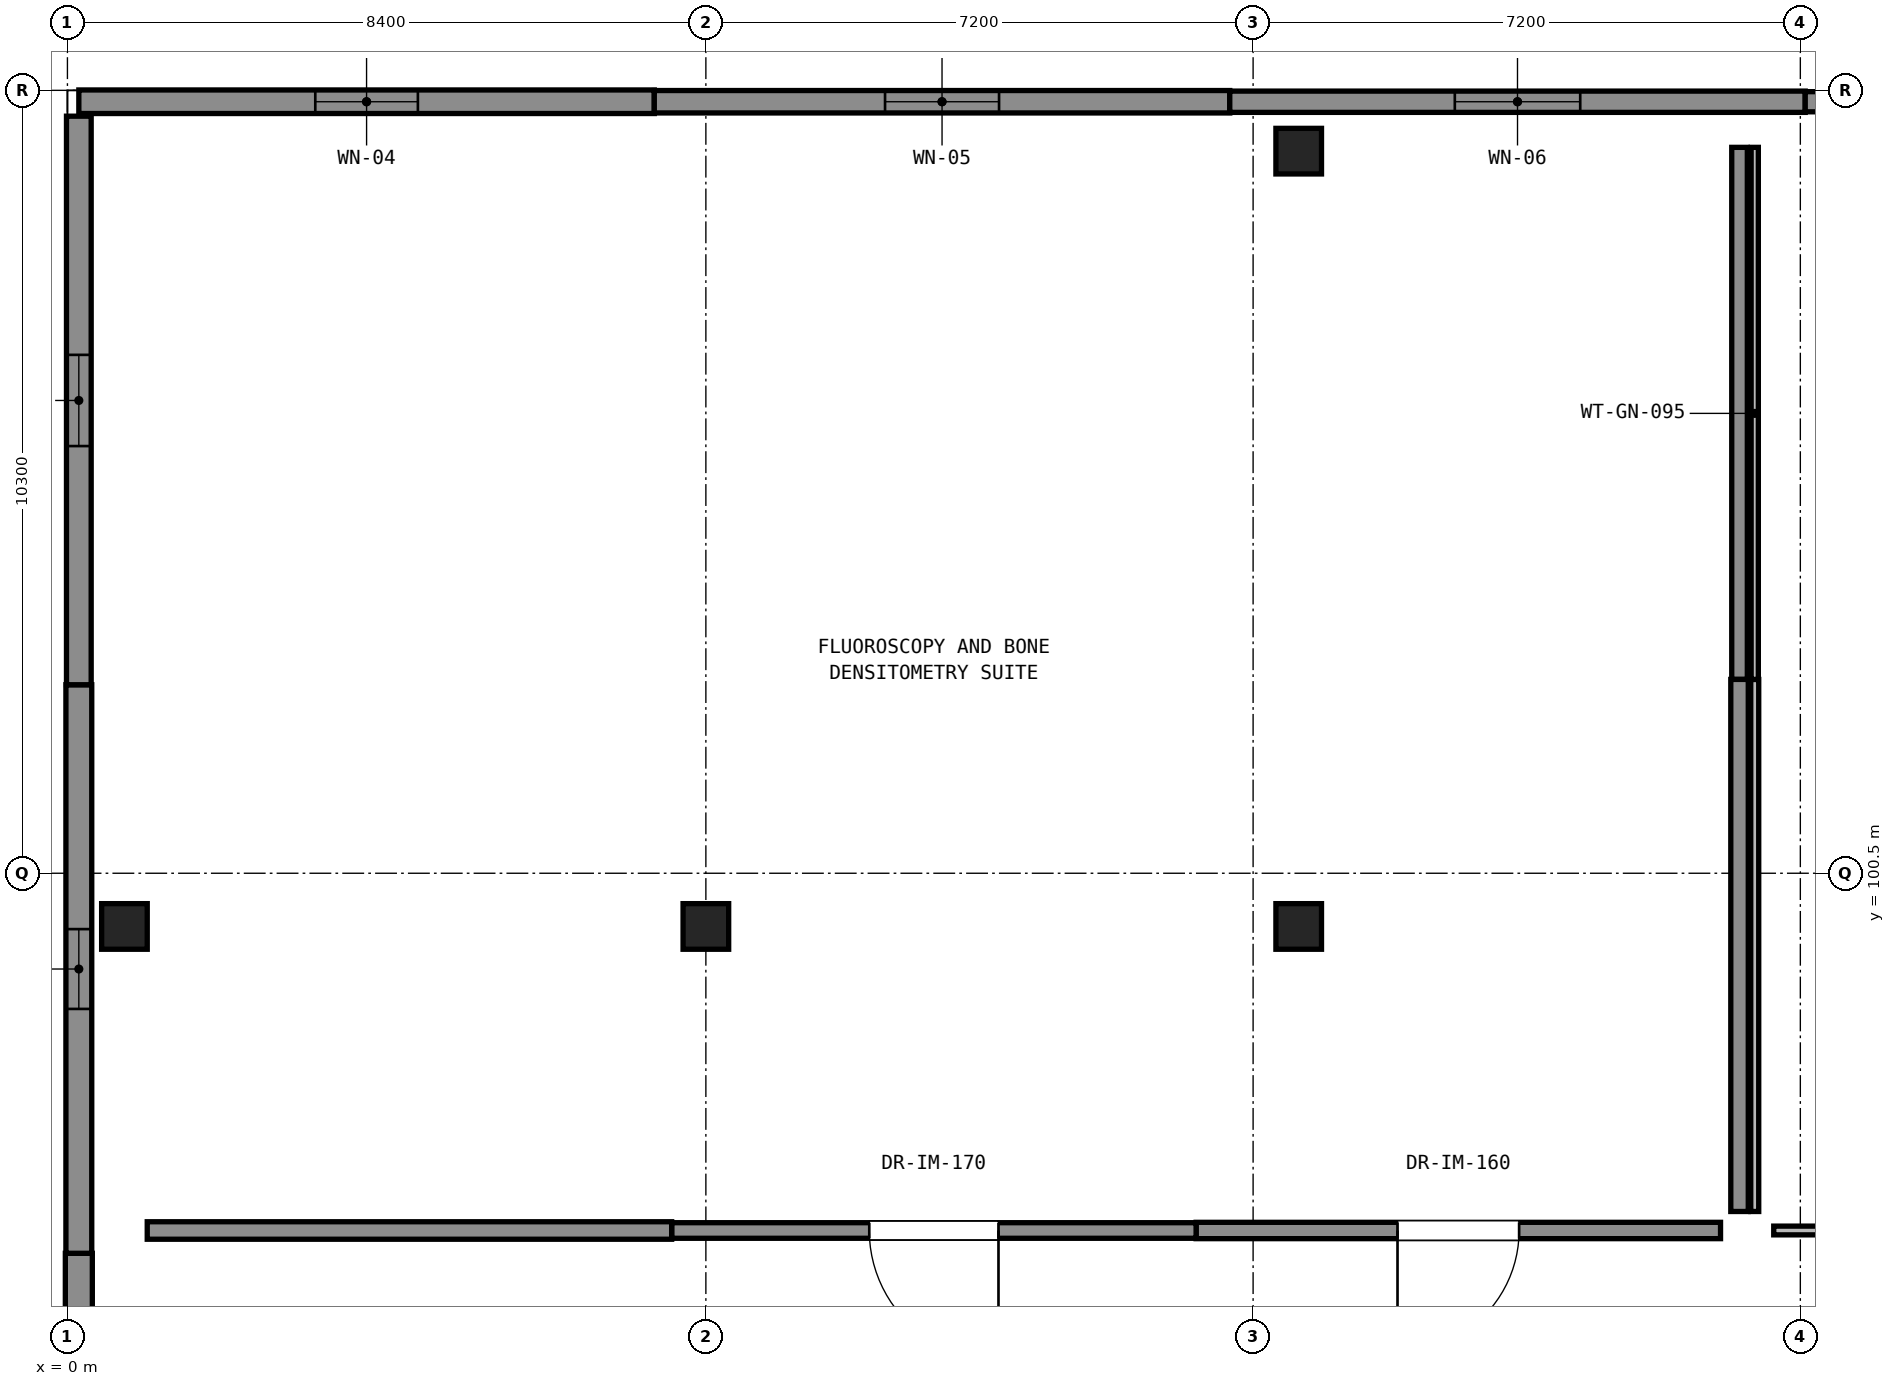
"""IFC4 building model, lengths in metres.
Left out: names, types, materials, properties, quantities, classifications, styles, units other than length and angle.
Written with IfcOpenShell. Run it as: python <this file> out.ifc"""

import sys

from ifc_helpers import new_model, si_unit, direction, frame, frame_2d, origin, origin_2d, place, context, subcontext, project, spatial, rectangle, extrude, element, fill, save


model = new_model("IFC4")
c1 = context("Model", 3, precision=1e-05, world=origin(), true_north=direction((0.0, 1.0)))
c2 = subcontext(c1, "Body", "Model", "MODEL_VIEW")
j1 = project(units=[si_unit("LENGTHUNIT", "METRE"), si_unit("PLANEANGLEUNIT", "RADIAN")], contexts=[c1])
p1 = place(None, origin())
s1 = spatial("IfcSite", under=j1, at=p1, CompositionType="ELEMENT")
p2 = place(p1, origin())
s2 = spatial("IfcBuilding", under=s1, at=p2, CompositionType="ELEMENT")
p3 = place(p2, frame((0.0, 0.0, 5.1)))
s3 = spatial("IfcBuildingStorey", under=s2, at=p3, CompositionType="ELEMENT", Elevation=5.1)
for number, where, z_axis, x_axis in (
    (1, (0.75, 99.8, 0.0), (0.0, 0.0, 1.0), (1.0, 0.0, 0.0)),
    (2, (8.4, 99.8, 0.0), (0.0, 0.0, 1.0), (1.0, 0.0, 0.0)),
    (3, (16.2, 99.8, 0.0), (0.0, 0.0, 1.0), (1.0, 0.0, 0.0)),
    (4, (16.2, 110.0, 0.0), (0.0, 0.0, 1.0), (1.0, 0.0, 0.0)),
):
    element("IfcColumn", number, at=place(p3, frame(where, z_axis=z_axis, x_axis=x_axis)), inside=s3, PredefinedType="COLUMN", context=c2, shape_type="SweptSolid", body=[
        extrude(rectangle(XDim=0.6, YDim=0.6, at=origin_2d()), origin(), (0.0, 0.0, 1.0), 4.42),
    ])
p4 = place(p3, frame((0.15, 88.02, 0.0), z_axis=(0.0, 0.0, 1.0), x_axis=(0.0, 1.0, 0.0)))
e5 = element("IfcWall", 5, at=p4, inside=s3, PredefinedType="SOLIDWALL", context=c2, shape_type="SweptSolid", body=[
    extrude(rectangle(XDim=7.48, YDim=0.355, at=frame_2d((3.74, 0.0))), origin(), (0.0, 0.0, 1.0), 4.13),
])
p5 = place(p4, frame((3.29, 0.0, 0.9)))
e6 = element("IfcOpeningElement", 6, at=p5, cuts=e5, PredefinedType="OPENING", context=c2, shape_type="SweptSolid", body=[
    extrude(rectangle(XDim=0.9, YDim=1.5, at=frame_2d((0.45, 0.75))), frame((0.0, 0.188, 0.0), z_axis=(0.0, -1.0, 0.0), x_axis=(1.0, 0.0, 0.0)), (0.0, 0.0, 1.0), 0.375),
])
p6 = place(p3, frame((0.15, 95.5, 0.0), z_axis=(0.0, 0.0, 1.0), x_axis=(0.0, 1.0, 0.0)))
e7 = element("IfcWall", 7, at=p6, inside=s3, PredefinedType="SOLIDWALL", context=c2, shape_type="SweptSolid", body=[
    extrude(rectangle(XDim=7.48, YDim=0.34, at=frame_2d((3.74, 0.0))), origin(), (0.0, 0.0, 1.0), 4.13),
])
p7 = place(p6, frame((3.215, 0.0, 0.9)))
e8 = element("IfcOpeningElement", 8, at=p7, cuts=e7, PredefinedType="OPENING", context=c2, shape_type="SweptSolid", body=[
    extrude(rectangle(XDim=1.05, YDim=1.5, at=frame_2d((0.525, 0.75))), frame((0.0, 0.18, 0.0), z_axis=(0.0, -1.0, 0.0), x_axis=(1.0, 0.0, 0.0)), (0.0, 0.0, 1.0), 0.36),
])
p8 = place(p3, frame((0.15, 102.98, 0.0), z_axis=(0.0, 0.0, 1.0), x_axis=(0.0, 1.0, 0.0)))
e9 = element("IfcWall", 9, at=p8, inside=s3, PredefinedType="SOLIDWALL", context=c2, shape_type="SweptSolid", body=[
    extrude(rectangle(XDim=7.48, YDim=0.325, at=frame_2d((3.74, 0.0))), origin(), (0.0, 0.0, 1.0), 4.13),
])
p9 = place(p8, frame((3.14, 0.0, 0.9)))
e10 = element("IfcOpeningElement", 10, at=p9, cuts=e9, PredefinedType="OPENING", context=c2, shape_type="SweptSolid", body=[
    extrude(rectangle(XDim=1.2, YDim=1.5, at=frame_2d((0.6, 0.75))), frame((0.0, 0.172, 0.0), z_axis=(0.0, -1.0, 0.0), x_axis=(1.0, 0.0, 0.0)), (0.0, 0.0, 1.0), 0.345),
])
p10 = place(p3, frame((0.15, 110.65, 0.0), z_axis=(0.0, 0.0, 1.0), x_axis=(1.0, 0.0, 0.0)))
e11 = element("IfcWall", 11, at=p10, inside=s3, PredefinedType="SOLIDWALL", context=c2, shape_type="SweptSolid", body=[
    extrude(rectangle(XDim=7.572, YDim=0.31, at=frame_2d((3.786, 0.0))), origin(), (0.0, 0.0, 1.0), 4.13),
])
p11 = place(p10, frame((3.111, 0.0, 0.9)))
e12 = element("IfcOpeningElement", 12, at=p11, cuts=e11, PredefinedType="OPENING", context=c2, shape_type="SweptSolid", body=[
    extrude(rectangle(XDim=1.35, YDim=1.5, at=frame_2d((0.675, 0.75))), frame((0.0, 0.165, 0.0), z_axis=(0.0, -1.0, 0.0), x_axis=(1.0, 0.0, 0.0)), (0.0, 0.0, 1.0), 0.33),
])
p12 = place(p3, frame((7.721, 110.65, 0.0), z_axis=(0.0, 0.0, 1.0), x_axis=(1.0, 0.0, 0.0)))
e13 = element("IfcWall", 13, at=p12, inside=s3, PredefinedType="SOLIDWALL", context=c2, shape_type="SweptSolid", body=[
    extrude(rectangle(XDim=7.572, YDim=0.295, at=frame_2d((3.786, 0.0))), origin(), (0.0, 0.0, 1.0), 4.13),
])
p13 = place(p12, frame((3.036, 0.0, 0.9)))
e14 = element("IfcOpeningElement", 14, at=p13, cuts=e13, PredefinedType="OPENING", context=c2, shape_type="SweptSolid", body=[
    extrude(rectangle(XDim=1.5, YDim=1.5, at=frame_2d((0.75, 0.75))), frame((0.0, 0.157, 0.0), z_axis=(0.0, -1.0, 0.0), x_axis=(1.0, 0.0, 0.0)), (0.0, 0.0, 1.0), 0.315),
])
p14 = place(p3, frame((15.293, 110.65, 0.0), z_axis=(0.0, 0.0, 1.0), x_axis=(1.0, 0.0, 0.0)))
e15 = element("IfcWall", 15, at=p14, inside=s3, PredefinedType="SOLIDWALL", context=c2, shape_type="SweptSolid", body=[
    extrude(rectangle(XDim=7.571, YDim=0.28, at=frame_2d((3.786, 0.0))), origin(), (0.0, 0.0, 1.0), 4.13),
])
p15 = place(p14, frame((2.961, 0.0, 0.9)))
e16 = element("IfcOpeningElement", 16, at=p15, cuts=e15, PredefinedType="OPENING", context=c2, shape_type="SweptSolid", body=[
    extrude(rectangle(XDim=1.65, YDim=1.5, at=frame_2d((0.825, 0.75))), frame((0.0, 0.15, 0.0), z_axis=(0.0, -1.0, 0.0), x_axis=(1.0, 0.0, 0.0)), (0.0, 0.0, 1.0), 0.3),
])
p16 = place(p3, frame((22.864, 110.65, 0.0), z_axis=(0.0, 0.0, 1.0), x_axis=(1.0, 0.0, 0.0)))
e17 = element("IfcWall", 17, at=p16, inside=s3, PredefinedType="SOLIDWALL", context=c2, shape_type="SweptSolid", body=[
    extrude(rectangle(XDim=7.572, YDim=0.265, at=frame_2d((3.786, 0.0))), origin(), (0.0, 0.0, 1.0), 4.13),
])
p17 = place(p16, frame((2.886, 0.0, 0.9)))
e18 = element("IfcOpeningElement", 18, at=p17, cuts=e17, PredefinedType="OPENING", context=c2, shape_type="SweptSolid", body=[
    extrude(rectangle(XDim=1.8, YDim=1.5, at=frame_2d((0.9, 0.75))), frame((0.0, 0.142, 0.0), z_axis=(0.0, -1.0, 0.0), x_axis=(1.0, 0.0, 0.0)), (0.0, 0.0, 1.0), 0.285),
])
p18 = place(p3, frame((22.0, 110.05, 0.0), z_axis=(0.0, 0.0, 1.0), x_axis=(0.0, -1.0, 0.0)))
e19 = element("IfcWall", 19, at=p18, inside=s3, PredefinedType="PARTITIONING", context=c2, shape_type="SweptSolid", body=[
    extrude(rectangle(XDim=7.0, YDim=0.205, at=frame_2d((3.5, 0.0))), origin(), (0.0, 0.0, 1.0), 3.514),
])
p19 = place(p3, frame((22.0, 103.05, 0.0), z_axis=(0.0, 0.0, 1.0), x_axis=(0.0, -1.0, 0.0)))
e20 = element("IfcWall", 20, at=p19, inside=s3, PredefinedType="PARTITIONING", context=c2, shape_type="SweptSolid", body=[
    extrude(rectangle(XDim=7.0, YDim=0.23, at=frame_2d((3.5, 0.0))), origin(), (0.0, 0.0, 1.0), 3.514),
])
p20 = place(p3, frame((21.75, 95.8, 0.0), z_axis=(0.0, 0.0, 1.0), x_axis=(-1.0, 0.0, 0.0)))
e21 = element("IfcWall", 21, at=p20, inside=s3, PredefinedType="PARTITIONING", context=c2, shape_type="SweptSolid", body=[
    extrude(rectangle(XDim=6.9, YDim=0.215, at=frame_2d((3.45, 0.0))), origin(), (0.0, 0.0, 1.0), 3.53),
])
p21 = place(p20, frame((2.65, 0.0, 0.0)))
e22 = element("IfcOpeningElement", 22, at=p21, cuts=e21, PredefinedType="OPENING", context=c2, shape_type="SweptSolid", body=[
    extrude(rectangle(XDim=1.6, YDim=2.35, at=frame_2d((0.8, 1.175))), frame((0.0, 0.117, 0.0), z_axis=(0.0, -1.0, 0.0), x_axis=(1.0, 0.0, 0.0)), (0.0, 0.0, 1.0), 0.235),
])
p22 = place(p3, frame((14.85, 95.8, 0.0), z_axis=(0.0, 0.0, 1.0), x_axis=(-1.0, 0.0, 0.0)))
e23 = element("IfcWall", 23, at=p22, inside=s3, PredefinedType="PARTITIONING", context=c2, shape_type="SweptSolid", body=[
    extrude(rectangle(XDim=6.9, YDim=0.205, at=frame_2d((3.45, 0.0))), origin(), (0.0, 0.0, 1.0), 3.33),
])
p23 = place(p22, frame((2.6, 0.0, 0.0)))
e24 = element("IfcOpeningElement", 24, at=p23, cuts=e23, PredefinedType="OPENING", context=c2, shape_type="SweptSolid", body=[
    extrude(rectangle(XDim=1.7, YDim=2.35, at=frame_2d((0.85, 1.175))), frame((0.0, 0.113, 0.0), z_axis=(0.0, -1.0, 0.0), x_axis=(1.0, 0.0, 0.0)), (0.0, 0.0, 1.0), 0.225),
])
p24 = place(p3, frame((7.95, 95.8, 0.0), z_axis=(0.0, 0.0, 1.0), x_axis=(-1.0, 0.0, 0.0)))
e25 = element("IfcWall", 25, at=p24, inside=s3, PredefinedType="PARTITIONING", context=c2, shape_type="SweptSolid", body=[
    extrude(rectangle(XDim=6.9, YDim=0.23, at=frame_2d((3.45, 0.0))), origin(), (0.0, 0.0, 1.0), 4.13),
])
p25 = place(p3, frame((28.6, 95.8, 0.0), z_axis=(0.0, 0.0, 1.0), x_axis=(-1.0, 0.0, 0.0)))
e26 = element("IfcWall", 26, at=p25, inside=s3, PredefinedType="PARTITIONING", context=c2, shape_type="SweptSolid", body=[
    extrude(rectangle(XDim=6.15, YDim=0.115, at=frame_2d((3.075, 0.0))), origin(), (0.0, 0.0, 1.0), 3.43),
])
p26 = place(p25, frame((2.525, 0.0, 0.0)))
e27 = element("IfcOpeningElement", 27, at=p26, cuts=e26, PredefinedType="OPENING", context=c2, shape_type="SweptSolid", body=[
    extrude(rectangle(XDim=1.1, YDim=2.2, at=frame_2d((0.55, 1.1))), frame((0.0, 0.067, 0.0), z_axis=(0.0, -1.0, 0.0), x_axis=(1.0, 0.0, 0.0)), (0.0, 0.0, 1.0), 0.135),
])
p27 = place(p3, frame((22.2, 96.05, 0.0), z_axis=(0.0, 0.0, 1.0), x_axis=(0.0, 1.0, 0.0)))
e28 = element("IfcWall", 28, at=p27, inside=s3, PredefinedType="PARTITIONING", context=c2, shape_type="SweptSolid", body=[
    extrude(rectangle(XDim=7.0, YDim=0.105, at=frame_2d((3.5, 0.0))), origin(), (0.0, 0.0, 1.0), 3.514),
])
p28 = place(p3, frame((22.2, 103.05, 0.0), z_axis=(0.0, 0.0, 1.0), x_axis=(0.0, 1.0, 0.0)))
e29 = element("IfcWall", 29, at=p28, inside=s3, PredefinedType="PARTITIONING", context=c2, shape_type="SweptSolid", body=[
    extrude(rectangle(XDim=7.0, YDim=0.095, at=frame_2d((3.5, 0.0))), origin(), (0.0, 0.0, 1.0), 3.514),
])
p29 = place(p7, origin())
e30 = element("IfcWindow", 30, at=p29, inside=s3, PartitioningType="SINGLE_PANEL", PredefinedType="WINDOW", context=c2, shape_type="SweptSolid", body=[
    extrude(rectangle(XDim=1.05, YDim=1.5, at=frame_2d((0.525, 0.75))), frame((0.0, 0.03, 0.0), z_axis=(0.0, -1.0, 0.0), x_axis=(1.0, 0.0, 0.0)), (0.0, 0.0, 1.0), 0.06),
])
fill(e8, e30)
p30 = place(p9, origin())
e31 = element("IfcWindow", 31, at=p30, inside=s3, PartitioningType="SINGLE_PANEL", PredefinedType="WINDOW", context=c2, shape_type="SweptSolid", body=[
    extrude(rectangle(XDim=1.2, YDim=1.5, at=frame_2d((0.6, 0.75))), frame((0.0, 0.03, 0.0), z_axis=(0.0, -1.0, 0.0), x_axis=(1.0, 0.0, 0.0)), (0.0, 0.0, 1.0), 0.06),
])
fill(e10, e31)
p31 = place(p11, origin())
e32 = element("IfcWindow", 32, at=p31, inside=s3, PartitioningType="SINGLE_PANEL", PredefinedType="WINDOW", context=c2, shape_type="SweptSolid", body=[
    extrude(rectangle(XDim=1.35, YDim=1.5, at=frame_2d((0.675, 0.75))), frame((0.0, 0.03, 0.0), z_axis=(0.0, -1.0, 0.0), x_axis=(1.0, 0.0, 0.0)), (0.0, 0.0, 1.0), 0.06),
])
fill(e12, e32)
p32 = place(p13, origin())
e33 = element("IfcWindow", 33, at=p32, inside=s3, PartitioningType="SINGLE_PANEL", PredefinedType="WINDOW", context=c2, shape_type="SweptSolid", body=[
    extrude(rectangle(XDim=1.5, YDim=1.5, at=frame_2d((0.75, 0.75))), frame((0.0, 0.03, 0.0), z_axis=(0.0, -1.0, 0.0), x_axis=(1.0, 0.0, 0.0)), (0.0, 0.0, 1.0), 0.06),
])
fill(e14, e33)
p33 = place(p15, origin())
e34 = element("IfcWindow", 34, at=p33, inside=s3, PartitioningType="SINGLE_PANEL", PredefinedType="WINDOW", context=c2, shape_type="SweptSolid", body=[
    extrude(rectangle(XDim=1.65, YDim=1.5, at=frame_2d((0.825, 0.75))), frame((0.0, 0.03, 0.0), z_axis=(0.0, -1.0, 0.0), x_axis=(1.0, 0.0, 0.0)), (0.0, 0.0, 1.0), 0.06),
])
fill(e16, e34)
p34 = place(p21, origin())
e35 = element("IfcDoor", 35, at=p34, inside=s3, OperationType="SINGLE_SWING_RIGHT", PredefinedType="DOOR", context=c2, shape_type="SweptSolid", body=[
    extrude(rectangle(XDim=1.6, YDim=2.35, at=frame_2d((0.8, 1.175))), frame((0.0, 0.025, 0.0), z_axis=(0.0, -1.0, 0.0), x_axis=(1.0, 0.0, 0.0)), (0.0, 0.0, 1.0), 0.05),
])
fill(e22, e35)
p35 = place(p23, origin())
e36 = element("IfcDoor", 36, at=p35, inside=s3, OperationType="SINGLE_SWING_LEFT", PredefinedType="DOOR", context=c2, shape_type="SweptSolid", body=[
    extrude(rectangle(XDim=1.7, YDim=2.35, at=frame_2d((0.85, 1.175))), frame((0.0, 0.025, 0.0), z_axis=(0.0, -1.0, 0.0), x_axis=(1.0, 0.0, 0.0)), (0.0, 0.0, 1.0), 0.05),
])
fill(e24, e36)
save(model, sys.argv[1])
